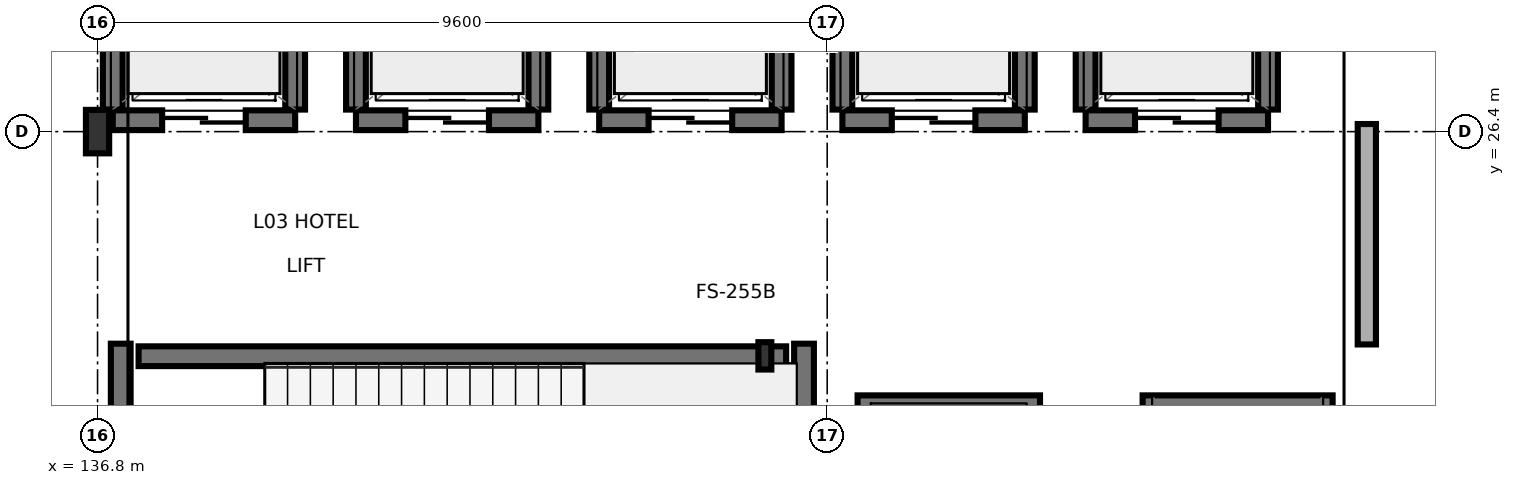
"""IFC4 building model, lengths in metres.
Left out: names, types, materials, properties, quantities, classifications, styles, units other than length and angle.
Written with IfcOpenShell. Run it as: python <this file> out.ifc"""

import sys

from ifc_helpers import new_model, si_unit, direction, frame, frame_2d, origin, origin_2d, place, context, subcontext, project, spatial, rectangle, i_section, extrude, element, fill, save


model = new_model("IFC4")
c1 = context("Model", 3, precision=1e-05, world=origin(), true_north=direction((0.0, 1.0)))
c2 = subcontext(c1, "Body", "Model", "MODEL_VIEW")
j1 = project(units=[si_unit("LENGTHUNIT", "METRE"), si_unit("PLANEANGLEUNIT", "RADIAN")], contexts=[c1])
p1 = place(None, origin())
s1 = spatial("IfcSite", under=j1, at=p1, CompositionType="ELEMENT")
p2 = place(p1, origin())
s2 = spatial("IfcBuilding", under=s1, at=p2, CompositionType="ELEMENT")
p3 = place(p2, frame((0.0, 0.0, 9.9)))
s3 = spatial("IfcBuildingStorey", under=s2, at=p3, CompositionType="ELEMENT", Elevation=9.9)
p4 = place(p3, frame((136.8, 26.4, 0.0), z_axis=(0.0, 0.0, 1.0), x_axis=(1.0, 0.0, 0.0)))
e1 = element("IfcColumn", 1, at=p4, inside=s3, PredefinedType="COLUMN", context=c2, shape_type="SweptSolid", body=[
    extrude(i_section(OverallWidth=0.306, OverallDepth=0.572, WebThickness=0.021, FlangeThickness=0.04, FilletRadius=0.027, at=origin_2d()), origin(), (0.0, 0.0, 1.0), 4.8),
])
p5 = place(p3, frame((145.58, 23.45, 0.0), z_axis=(0.0, 0.0, 1.0), x_axis=(1.0, 0.0, 0.0)))
e2 = element("IfcColumn", 2, at=p5, inside=s3, PredefinedType="PILASTER", context=c2, shape_type="SweptSolid", body=[
    extrude(i_section(OverallWidth=0.17, OverallDepth=0.36, WebThickness=0.008, FlangeThickness=0.013, FilletRadius=0.018, at=origin_2d()), origin(), (0.0, 0.0, 1.0), 4.8),
])
p6 = place(p3, frame((137.105, 19.34, 0.0), z_axis=(0.0, 0.0, 1.0), x_axis=(0.0, 1.0, 0.0)))
e3 = element("IfcWall", 3, at=p6, inside=s3, PredefinedType="SHEAR", context=c2, shape_type="SweptSolid", body=[
    extrude(rectangle(XDim=4.27, YDim=0.26, at=frame_2d((2.135, 0.0))), origin(), (0.0, 0.0, 1.0), 3.535),
])
p7 = place(p6, frame((0.61, 0.0, 0.0)))
e4 = element("IfcOpeningElement", 4, at=p7, cuts=e3, PredefinedType="OPENING", context=c2, shape_type="SweptSolid", body=[
    extrude(rectangle(XDim=1.1, YDim=2.2, at=frame_2d((0.55, 1.1))), frame((0.0, 0.14, 0.0), z_axis=(0.0, -1.0, 0.0), x_axis=(1.0, 0.0, 0.0)), (0.0, 0.0, 1.0), 0.28),
])
p8 = place(p3, frame((146.095, 19.34, 0.0), z_axis=(0.0, 0.0, 1.0), x_axis=(0.0, 1.0, 0.0)))
e5 = element("IfcWall", 5, at=p8, inside=s3, PredefinedType="SHEAR", context=c2, shape_type="SweptSolid", body=[
    extrude(rectangle(XDim=4.27, YDim=0.26, at=frame_2d((2.135, 0.0))), origin(), (0.0, 0.0, 1.0), 3.535),
])
p9 = place(p3, frame((137.34, 23.445, 0.0), z_axis=(0.0, 0.0, 1.0), x_axis=(1.0, 0.0, 0.0)))
e6 = element("IfcWall", 6, at=p9, inside=s3, PredefinedType="SHEAR", context=c2, shape_type="SweptSolid", body=[
    extrude(rectangle(XDim=8.52, YDim=0.26, at=frame_2d((4.26, 0.0))), origin(), (0.0, 0.0, 1.0), 3.535),
])
p10 = place(p3, frame((137.0, 26.55, 0.0), z_axis=(0.0, 0.0, 1.0), x_axis=(1.0, 0.0, 0.0)))
e7 = element("IfcWall", 7, at=p10, inside=s3, PredefinedType="SHEAR", context=c2, shape_type="SweptSolid", body=[
    extrude(rectangle(XDim=2.4, YDim=0.26, at=frame_2d((1.2, 0.0))), origin(), (0.0, 0.0, 1.0), 3.535),
])
p11 = place(p10, frame((0.65, 0.0, 0.0)))
e8 = element("IfcOpeningElement", 8, at=p11, cuts=e7, PredefinedType="OPENING", context=c2, shape_type="SweptSolid", body=[
    extrude(rectangle(XDim=1.1, YDim=2.2, at=frame_2d((0.55, 1.1))), frame((0.0, 0.14, 0.0), z_axis=(0.0, -1.0, 0.0), x_axis=(1.0, 0.0, 0.0)), (0.0, 0.0, 1.0), 0.28),
])
for number, where, z_axis, x_axis in (
    (9, (137.0, 26.69, 0.0), (0.0, 0.0, 1.0), (0.0, 1.0, 0.0)),
    (10, (139.4, 26.69, 0.0), (0.0, 0.0, 1.0), (0.0, 1.0, 0.0)),
):
    element("IfcWall", number, at=place(p3, frame(where, z_axis=z_axis, x_axis=x_axis)), inside=s3, PredefinedType="SHEAR", context=c2, shape_type="SweptSolid", body=[
        extrude(rectangle(XDim=1.82, YDim=0.26, at=frame_2d((0.91, 0.0))), origin(), (0.0, 0.0, 1.0), 3.535),
    ])
p12 = place(p3, frame((140.2, 26.55, 0.0), z_axis=(0.0, 0.0, 1.0), x_axis=(1.0, 0.0, 0.0)))
e11 = element("IfcWall", 11, at=p12, inside=s3, PredefinedType="SHEAR", context=c2, shape_type="SweptSolid", body=[
    extrude(rectangle(XDim=2.4, YDim=0.26, at=frame_2d((1.2, 0.0))), origin(), (0.0, 0.0, 1.0), 4.54),
])
p13 = place(p12, frame((0.65, 0.0, 0.0)))
e12 = element("IfcOpeningElement", 12, at=p13, cuts=e11, PredefinedType="OPENING", context=c2, shape_type="SweptSolid", body=[
    extrude(rectangle(XDim=1.1, YDim=2.2, at=frame_2d((0.55, 1.1))), frame((0.0, 0.14, 0.0), z_axis=(0.0, -1.0, 0.0), x_axis=(1.0, 0.0, 0.0)), (0.0, 0.0, 1.0), 0.28),
])
for number, where, z_axis, x_axis in (
    (13, (140.2, 26.69, 0.0), (0.0, 0.0, 1.0), (0.0, 1.0, 0.0)),
    (14, (142.6, 26.69, 0.0), (0.0, 0.0, 1.0), (0.0, 1.0, 0.0)),
):
    element("IfcWall", number, at=place(p3, frame(where, z_axis=z_axis, x_axis=x_axis)), inside=s3, PredefinedType="SHEAR", context=c2, shape_type="SweptSolid", body=[
        extrude(rectangle(XDim=1.82, YDim=0.26, at=frame_2d((0.91, 0.0))), origin(), (0.0, 0.0, 1.0), 4.54),
    ])
p14 = place(p3, frame((143.4, 26.55, 0.0), z_axis=(0.0, 0.0, 1.0), x_axis=(1.0, 0.0, 0.0)))
e15 = element("IfcWall", 15, at=p14, inside=s3, PredefinedType="SHEAR", context=c2, shape_type="SweptSolid", body=[
    extrude(rectangle(XDim=2.4, YDim=0.26, at=frame_2d((1.2, 0.0))), origin(), (0.0, 0.0, 1.0), 4.54),
])
p15 = place(p14, frame((0.65, 0.0, 0.0)))
e16 = element("IfcOpeningElement", 16, at=p15, cuts=e15, PredefinedType="OPENING", context=c2, shape_type="SweptSolid", body=[
    extrude(rectangle(XDim=1.1, YDim=2.2, at=frame_2d((0.55, 1.1))), frame((0.0, 0.14, 0.0), z_axis=(0.0, -1.0, 0.0), x_axis=(1.0, 0.0, 0.0)), (0.0, 0.0, 1.0), 0.28),
])
for number, where, z_axis, x_axis in (
    (17, (143.4, 26.69, 0.0), (0.0, 0.0, 1.0), (0.0, 1.0, 0.0)),
    (18, (145.8, 26.69, 0.0), (0.0, 0.0, 1.0), (0.0, 1.0, 0.0)),
):
    element("IfcWall", number, at=place(p3, frame(where, z_axis=z_axis, x_axis=x_axis)), inside=s3, PredefinedType="SHEAR", context=c2, shape_type="SweptSolid", body=[
        extrude(rectangle(XDim=1.82, YDim=0.26, at=frame_2d((0.91, 0.0))), origin(), (0.0, 0.0, 1.0), 4.54),
    ])
p16 = place(p3, frame((146.6, 26.55, 0.0), z_axis=(0.0, 0.0, 1.0), x_axis=(1.0, 0.0, 0.0)))
e19 = element("IfcWall", 19, at=p16, inside=s3, PredefinedType="SHEAR", context=c2, shape_type="SweptSolid", body=[
    extrude(rectangle(XDim=2.4, YDim=0.26, at=frame_2d((1.2, 0.0))), origin(), (0.0, 0.0, 1.0), 4.54),
])
p17 = place(p16, frame((0.65, 0.0, 0.0)))
e20 = element("IfcOpeningElement", 20, at=p17, cuts=e19, PredefinedType="OPENING", context=c2, shape_type="SweptSolid", body=[
    extrude(rectangle(XDim=1.1, YDim=2.2, at=frame_2d((0.55, 1.1))), frame((0.0, 0.14, 0.0), z_axis=(0.0, -1.0, 0.0), x_axis=(1.0, 0.0, 0.0)), (0.0, 0.0, 1.0), 0.28),
])
for number, where, z_axis, x_axis in (
    (21, (146.6, 26.69, 0.0), (0.0, 0.0, 1.0), (0.0, 1.0, 0.0)),
    (22, (149.0, 26.69, 0.0), (0.0, 0.0, 1.0), (0.0, 1.0, 0.0)),
):
    element("IfcWall", number, at=place(p3, frame(where, z_axis=z_axis, x_axis=x_axis)), inside=s3, PredefinedType="SHEAR", context=c2, shape_type="SweptSolid", body=[
        extrude(rectangle(XDim=1.82, YDim=0.26, at=frame_2d((0.91, 0.0))), origin(), (0.0, 0.0, 1.0), 4.54),
    ])
p18 = place(p3, frame((149.8, 26.55, 0.0), z_axis=(0.0, 0.0, 1.0), x_axis=(1.0, 0.0, 0.0)))
e23 = element("IfcWall", 23, at=p18, inside=s3, PredefinedType="SHEAR", context=c2, shape_type="SweptSolid", body=[
    extrude(rectangle(XDim=2.4, YDim=0.26, at=frame_2d((1.2, 0.0))), origin(), (0.0, 0.0, 1.0), 4.54),
])
p19 = place(p18, frame((0.65, 0.0, 0.0)))
e24 = element("IfcOpeningElement", 24, at=p19, cuts=e23, PredefinedType="OPENING", context=c2, shape_type="SweptSolid", body=[
    extrude(rectangle(XDim=1.1, YDim=2.2, at=frame_2d((0.55, 1.1))), frame((0.0, 0.14, 0.0), z_axis=(0.0, -1.0, 0.0), x_axis=(1.0, 0.0, 0.0)), (0.0, 0.0, 1.0), 0.28),
])
for number, where, z_axis, x_axis in (
    (25, (149.8, 26.69, 0.0), (0.0, 0.0, 1.0), (0.0, 1.0, 0.0)),
    (26, (152.2, 26.69, 0.0), (0.0, 0.0, 1.0), (0.0, 1.0, 0.0)),
):
    element("IfcWall", number, at=place(p3, frame(where, z_axis=z_axis, x_axis=x_axis)), inside=s3, PredefinedType="SHEAR", context=c2, shape_type="SweptSolid", body=[
        extrude(rectangle(XDim=1.82, YDim=0.26, at=frame_2d((0.91, 0.0))), origin(), (0.0, 0.0, 1.0), 4.54),
    ])
p20 = place(p3, frame((146.8, 22.8, 0.0), z_axis=(0.0, 0.0, 1.0), x_axis=(1.0, 0.0, 0.0)))
e27 = element("IfcWall", 27, at=p20, inside=s3, PredefinedType="SHEAR", context=c2, shape_type="SweptSolid", body=[
    extrude(rectangle(XDim=2.4, YDim=0.26, at=frame_2d((1.2, 0.0))), origin(), (0.0, 0.0, 1.0), 4.54),
])
p21 = place(p3, frame((150.55, 22.8, 0.0), z_axis=(0.0, 0.0, 1.0), x_axis=(1.0, 0.0, 0.0)))
e28 = element("IfcWall", 28, at=p21, inside=s3, PredefinedType="SHEAR", context=c2, shape_type="SweptSolid", body=[
    extrude(rectangle(XDim=2.5, YDim=0.26, at=frame_2d((1.25, 0.0))), origin(), (0.0, 0.0, 1.0), 4.54),
])
p22 = place(p3, frame((153.5, 23.6, 0.0), z_axis=(0.0, 0.0, 1.0), x_axis=(0.0, 1.0, 0.0)))
e29 = element("IfcWall", 29, at=p22, inside=s3, PredefinedType="SOLIDWALL", context=c2, shape_type="SweptSolid", body=[
    extrude(rectangle(XDim=2.9, YDim=0.24, at=frame_2d((1.45, 0.0))), origin(), (0.0, 0.0, 1.0), 4.54),
])
p23 = place(p11, origin())
e30 = element("IfcDoor", 30, at=p23, inside=s3, OperationType="SLIDING_TO_LEFT", PredefinedType="DOOR", context=c2, shape_type="SweptSolid", body=[
    extrude(rectangle(XDim=1.1, YDim=2.2, at=frame_2d((0.55, 1.1))), frame((0.0, 0.025, 0.0), z_axis=(0.0, -1.0, 0.0), x_axis=(1.0, 0.0, 0.0)), (0.0, 0.0, 1.0), 0.05),
])
fill(e8, e30)
p24 = place(p13, origin())
e31 = element("IfcDoor", 31, at=p24, inside=s3, OperationType="SLIDING_TO_RIGHT", PredefinedType="DOOR", context=c2, shape_type="SweptSolid", body=[
    extrude(rectangle(XDim=1.1, YDim=2.2, at=frame_2d((0.55, 1.1))), frame((0.0, 0.025, 0.0), z_axis=(0.0, -1.0, 0.0), x_axis=(1.0, 0.0, 0.0)), (0.0, 0.0, 1.0), 0.05),
])
fill(e12, e31)
p25 = place(p15, origin())
e32 = element("IfcDoor", 32, at=p25, inside=s3, OperationType="SLIDING_TO_LEFT", PredefinedType="DOOR", context=c2, shape_type="SweptSolid", body=[
    extrude(rectangle(XDim=1.1, YDim=2.2, at=frame_2d((0.55, 1.1))), frame((0.0, 0.025, 0.0), z_axis=(0.0, -1.0, 0.0), x_axis=(1.0, 0.0, 0.0)), (0.0, 0.0, 1.0), 0.05),
])
fill(e16, e32)
p26 = place(p17, origin())
e33 = element("IfcDoor", 33, at=p26, inside=s3, OperationType="SLIDING_TO_RIGHT", PredefinedType="DOOR", context=c2, shape_type="SweptSolid", body=[
    extrude(rectangle(XDim=1.1, YDim=2.2, at=frame_2d((0.55, 1.1))), frame((0.0, 0.025, 0.0), z_axis=(0.0, -1.0, 0.0), x_axis=(1.0, 0.0, 0.0)), (0.0, 0.0, 1.0), 0.05),
])
fill(e20, e33)
p27 = place(p19, origin())
e34 = element("IfcDoor", 34, at=p27, inside=s3, OperationType="SLIDING_TO_LEFT", PredefinedType="DOOR", context=c2, shape_type="SweptSolid", body=[
    extrude(rectangle(XDim=1.1, YDim=2.2, at=frame_2d((0.55, 1.1))), frame((0.0, 0.025, 0.0), z_axis=(0.0, -1.0, 0.0), x_axis=(1.0, 0.0, 0.0)), (0.0, 0.0, 1.0), 0.05),
])
fill(e24, e34)
save(model, sys.argv[1])
